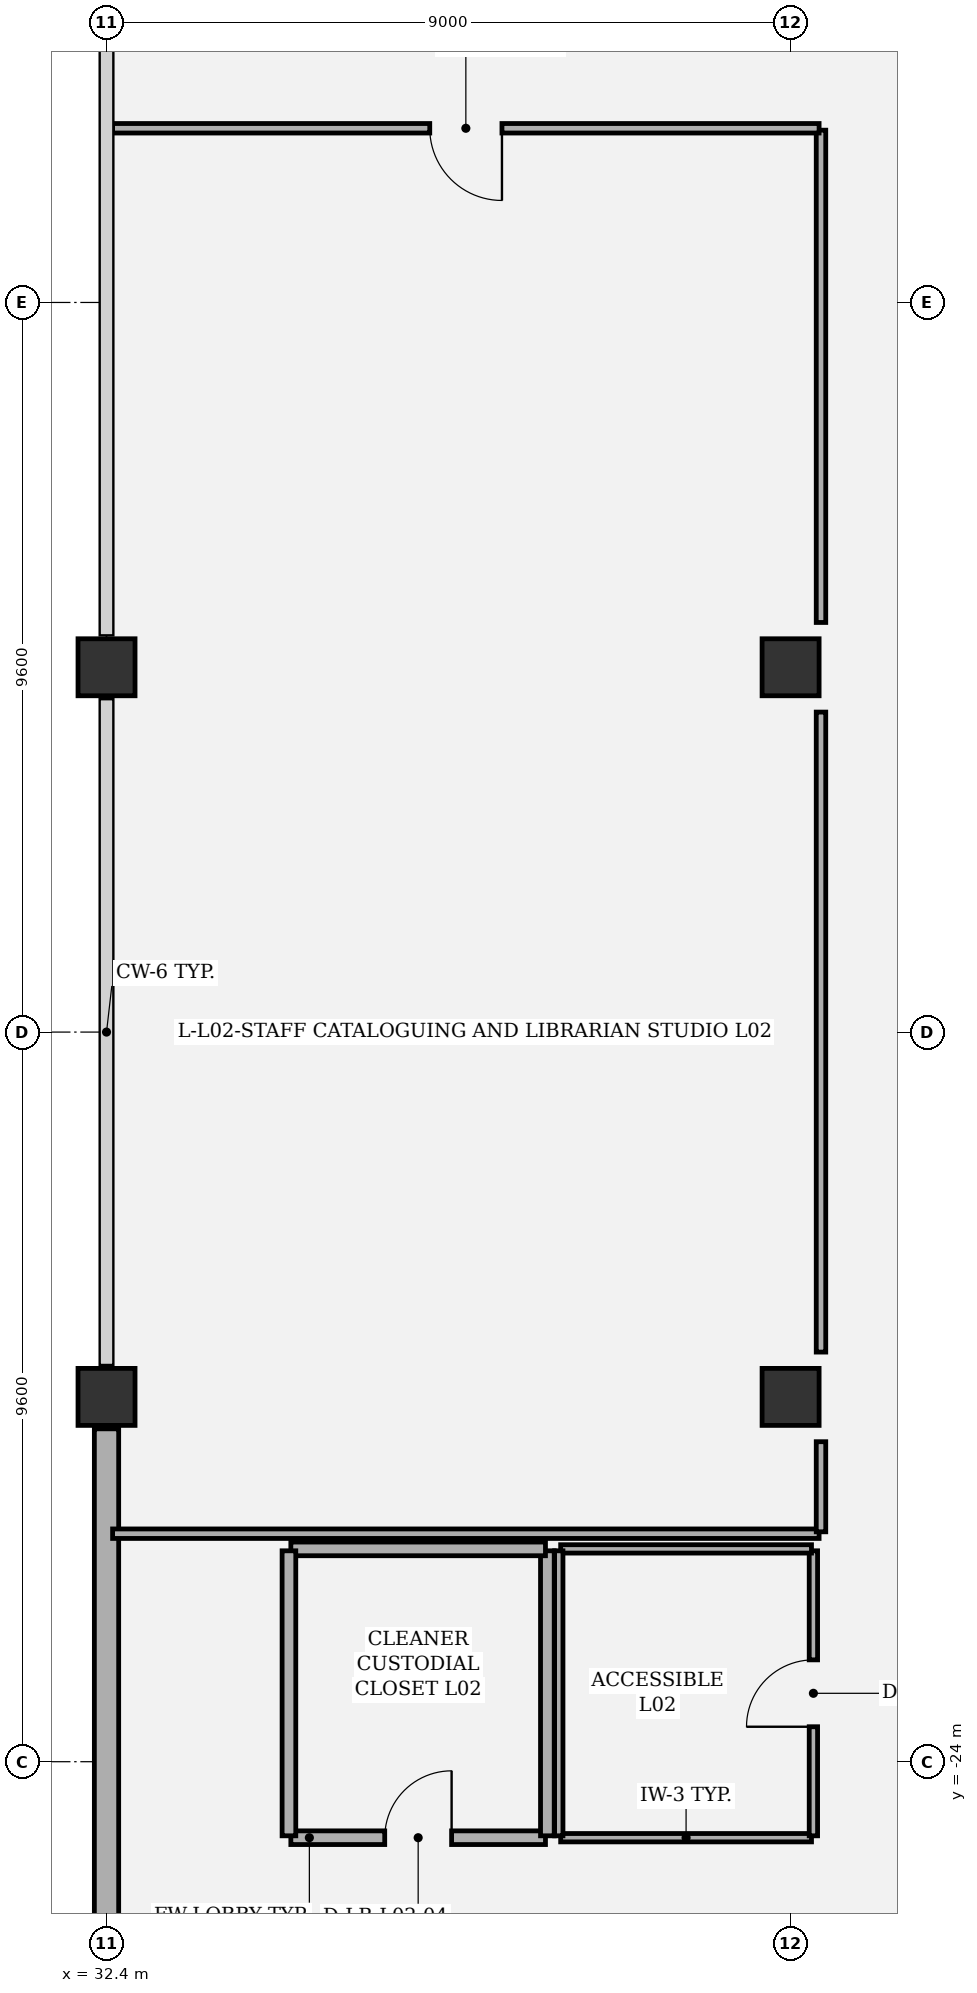
"""IFC4 building model, lengths in metres.
Left out: names, types, materials, properties, quantities, classifications, styles, units other than length and angle.
Written with IfcOpenShell. Run it as: python <this file> out.ifc"""

import sys

from ifc_helpers import new_model, si_unit, direction, frame, frame_2d, origin, origin_2d, place, context, subcontext, project, spatial, rectangle, extrude, element, fill, save


model = new_model("IFC4")
c1 = context("Model", 3, precision=1e-05, world=origin(), true_north=direction((0.0, 1.0)))
c2 = subcontext(c1, "Body", "Model", "MODEL_VIEW")
j1 = project(units=[si_unit("LENGTHUNIT", "METRE"), si_unit("PLANEANGLEUNIT", "RADIAN")], contexts=[c1])
p1 = place(None, origin())
s1 = spatial("IfcSite", under=j1, at=p1, CompositionType="ELEMENT")
p2 = place(p1, origin())
s2 = spatial("IfcBuilding", under=s1, at=p2, CompositionType="ELEMENT")
p3 = place(p2, frame((0.0, 0.0, 12.0)))
s3 = spatial("IfcBuildingStorey", under=s2, at=p3, CompositionType="ELEMENT", Elevation=12.0)
for number, where, z_axis, x_axis in (
    (1, (32.4, -19.2, 0.0), (0.0, 0.0, 1.0), (1.0, 0.0, 0.0)),
    (2, (32.4, -9.6, 0.0), (0.0, 0.0, 1.0), (1.0, 0.0, 0.0)),
    (3, (41.4, -19.2, 0.0), (0.0, 0.0, 1.0), (1.0, 0.0, 0.0)),
    (4, (41.4, -9.6, 0.0), (0.0, 0.0, 1.0), (1.0, 0.0, 0.0)),
):
    element("IfcColumn", number, at=place(p3, frame(where, z_axis=z_axis, x_axis=x_axis)), inside=s3, PredefinedType="COLUMN", context=c2, shape_type="SweptSolid", body=[
        extrude(rectangle(XDim=0.75, YDim=0.75, at=origin_2d()), origin(), (0.0, 0.0, 1.0), 5.0),
    ])
p4 = place(p3, frame((32.4, -28.38, 0.0), z_axis=(0.0, 0.0, 1.0), x_axis=(0.0, 1.0, 0.0)))
e5 = element("IfcWall", 5, at=p4, inside=s3, PredefinedType="SOLIDWALL", context=c2, shape_type="SweptSolid", body=[
    extrude(rectangle(XDim=8.76, YDim=0.32, at=frame_2d((4.38, 0.0))), origin(), (0.0, 0.0, 1.0), 3.937),
])
p5 = place(p3, frame((38.375, -25.0, 0.0), z_axis=(0.0, 0.0, 1.0), x_axis=(1.0, 0.0, 0.0)))
e6 = element("IfcWall", 6, at=p5, inside=s3, PredefinedType="PARTITIONING", context=c2, shape_type="SweptSolid", body=[
    extrude(rectangle(XDim=3.3, YDim=0.11, at=frame_2d((1.65, 0.0))), origin(), (0.0, 0.0, 1.0), 4.74),
])
p6 = place(p3, frame((41.7, -24.975, 0.0), z_axis=(0.0, 0.0, 1.0), x_axis=(0.0, 1.0, 0.0)))
e7 = element("IfcWall", 7, at=p6, inside=s3, PredefinedType="PARTITIONING", context=c2, shape_type="SweptSolid", body=[
    extrude(rectangle(XDim=3.75, YDim=0.11, at=frame_2d((1.875, 0.0))), origin(), (0.0, 0.0, 1.0), 4.094),
])
p7 = place(p6, frame((1.435, 0.0, 0.0)))
e8 = element("IfcOpeningElement", 8, at=p7, cuts=e7, PredefinedType="OPENING", context=c2, shape_type="SweptSolid", body=[
    extrude(rectangle(XDim=0.88, YDim=2.1, at=frame_2d((0.44, 1.05))), frame((0.0, 0.065, 0.0), z_axis=(0.0, -1.0, 0.0), x_axis=(1.0, 0.0, 0.0)), (0.0, 0.0, 1.0), 0.13),
])
p8 = place(p3, frame((41.675, -21.2, 0.0), z_axis=(0.0, 0.0, 1.0), x_axis=(-1.0, 0.0, 0.0)))
e9 = element("IfcWall", 9, at=p8, inside=s3, PredefinedType="PARTITIONING", context=c2, shape_type="SweptSolid", body=[
    extrude(rectangle(XDim=3.3, YDim=0.11, at=frame_2d((1.65, 0.0))), origin(), (0.0, 0.0, 1.0), 4.74),
])
p9 = place(p3, frame((38.35, -21.225, 0.0), z_axis=(0.0, 0.0, 1.0), x_axis=(0.0, -1.0, 0.0)))
e10 = element("IfcWall", 10, at=p9, inside=s3, PredefinedType="PARTITIONING", context=c2, shape_type="SweptSolid", body=[
    extrude(rectangle(XDim=3.75, YDim=0.11, at=frame_2d((1.875, 0.0))), origin(), (0.0, 0.0, 1.0), 4.74),
])
p10 = place(p3, frame((34.825, -25.0, 0.0), z_axis=(0.0, 0.0, 1.0), x_axis=(1.0, 0.0, 0.0)))
e11 = element("IfcWall", 11, at=p10, inside=s3, PredefinedType="PARTITIONING", context=c2, shape_type="SweptSolid", body=[
    extrude(rectangle(XDim=3.35, YDim=0.18, at=frame_2d((1.675, 0.0))), origin(), (0.0, 0.0, 1.0), 4.74),
])
p11 = place(p10, frame((1.235, 0.0, 0.0)))
e12 = element("IfcOpeningElement", 12, at=p11, cuts=e11, PredefinedType="OPENING", context=c2, shape_type="SweptSolid", body=[
    extrude(rectangle(XDim=0.88, YDim=2.1, at=frame_2d((0.44, 1.05))), frame((0.0, 0.1, 0.0), z_axis=(0.0, -1.0, 0.0), x_axis=(1.0, 0.0, 0.0)), (0.0, 0.0, 1.0), 0.2),
])
p12 = place(p3, frame((38.2, -24.975, 0.0), z_axis=(0.0, 0.0, 1.0), x_axis=(0.0, 1.0, 0.0)))
e13 = element("IfcWall", 13, at=p12, inside=s3, PredefinedType="PARTITIONING", context=c2, shape_type="SweptSolid", body=[
    extrude(rectangle(XDim=3.75, YDim=0.18, at=frame_2d((1.875, 0.0))), origin(), (0.0, 0.0, 1.0), 4.74),
])
p13 = place(p3, frame((38.175, -21.2, 0.0), z_axis=(0.0, 0.0, 1.0), x_axis=(-1.0, 0.0, 0.0)))
e14 = element("IfcWall", 14, at=p13, inside=s3, PredefinedType="PARTITIONING", context=c2, shape_type="SweptSolid", body=[
    extrude(rectangle(XDim=3.35, YDim=0.18, at=frame_2d((1.675, 0.0))), origin(), (0.0, 0.0, 1.0), 4.74),
])
p14 = place(p3, frame((34.8, -21.225, 0.0), z_axis=(0.0, 0.0, 1.0), x_axis=(0.0, -1.0, 0.0)))
e15 = element("IfcWall", 15, at=p14, inside=s3, PredefinedType="PARTITIONING", context=c2, shape_type="SweptSolid", body=[
    extrude(rectangle(XDim=3.75, YDim=0.18, at=frame_2d((1.875, 0.0))), origin(), (0.0, 0.0, 1.0), 4.74),
])
p15 = place(p3, frame((32.48, -21.0, 0.0), z_axis=(0.0, 0.0, 1.0), x_axis=(1.0, 0.0, 0.0)))
e16 = element("IfcWall", 16, at=p15, inside=s3, PredefinedType="PARTITIONING", context=c2, shape_type="SweptSolid", body=[
    extrude(rectangle(XDim=9.295, YDim=0.125, at=frame_2d((4.647, 0.0))), origin(), (0.0, 0.0, 1.0), 4.74),
])
p16 = place(p3, frame((41.8, -20.975, 0.0), z_axis=(0.0, 0.0, 1.0), x_axis=(0.0, 1.0, 0.0)))
e17 = element("IfcWall", 17, at=p16, inside=s3, PredefinedType="PARTITIONING", context=c2, shape_type="SweptSolid", body=[
    extrude(rectangle(XDim=1.186, YDim=0.125, at=frame_2d((0.593, 0.0))), origin(), (0.0, 0.0, 1.0), 4.74),
])
p17 = place(p3, frame((41.8, -18.61, 0.0), z_axis=(0.0, 0.0, 1.0), x_axis=(0.0, 1.0, 0.0)))
e18 = element("IfcWall", 18, at=p17, inside=s3, PredefinedType="PARTITIONING", context=c2, shape_type="SweptSolid", body=[
    extrude(rectangle(XDim=8.421, YDim=0.125, at=frame_2d((4.21, 0.0))), origin(), (0.0, 0.0, 1.0), 4.74),
])
p18 = place(p3, frame((41.8, -9.01, 0.0), z_axis=(0.0, 0.0, 1.0), x_axis=(0.0, 1.0, 0.0)))
e19 = element("IfcWall", 19, at=p18, inside=s3, PredefinedType="PARTITIONING", context=c2, shape_type="SweptSolid", body=[
    extrude(rectangle(XDim=6.477, YDim=0.125, at=frame_2d((3.239, 0.0))), origin(), (0.0, 0.0, 1.0), 4.74),
])
p19 = place(p3, frame((41.775, -2.508, 0.0), z_axis=(0.0, 0.0, 1.0), x_axis=(-1.0, 0.0, 0.0)))
e20 = element("IfcWall", 20, at=p19, inside=s3, PredefinedType="PARTITIONING", context=c2, shape_type="SweptSolid", body=[
    extrude(rectangle(XDim=9.295, YDim=0.125, at=frame_2d((4.647, 0.0))), origin(), (0.0, 0.0, 1.0), 4.253),
])
p20 = place(p19, frame((4.172, 0.0, 0.0)))
e21 = element("IfcOpeningElement", 21, at=p20, cuts=e20, PredefinedType="OPENING", context=c2, shape_type="SweptSolid", body=[
    extrude(rectangle(XDim=0.95, YDim=2.15, at=frame_2d((0.475, 1.075))), frame((0.0, 0.073, 0.0), z_axis=(0.0, -1.0, 0.0), x_axis=(1.0, 0.0, 0.0)), (0.0, 0.0, 1.0), 0.145),
])
p21 = place(p7, origin())
e22 = element("IfcDoor", 22, at=p21, inside=s3, OperationType="SINGLE_SWING_LEFT", PredefinedType="DOOR", context=c2, shape_type="SweptSolid", body=[
    extrude(rectangle(XDim=0.88, YDim=2.1, at=frame_2d((0.44, 1.05))), frame((0.0, 0.025, 0.0), z_axis=(0.0, -1.0, 0.0), x_axis=(1.0, 0.0, 0.0)), (0.0, 0.0, 1.0), 0.05),
])
fill(e8, e22)
p22 = place(p11, origin())
e23 = element("IfcDoor", 23, at=p22, inside=s3, OperationType="SINGLE_SWING_RIGHT", PredefinedType="DOOR", context=c2, shape_type="SweptSolid", body=[
    extrude(rectangle(XDim=0.88, YDim=2.1, at=frame_2d((0.44, 1.05))), frame((0.0, 0.025, 0.0), z_axis=(0.0, -1.0, 0.0), x_axis=(1.0, 0.0, 0.0)), (0.0, 0.0, 1.0), 0.05),
])
fill(e12, e23)
p23 = place(p20, origin())
e24 = element("IfcDoor", 24, at=p23, inside=s3, OperationType="SINGLE_SWING_LEFT", PredefinedType="DOOR", context=c2, shape_type="SweptSolid", body=[
    extrude(rectangle(XDim=0.95, YDim=2.15, at=frame_2d((0.475, 1.075))), frame((0.0, 0.025, 0.0), z_axis=(0.0, -1.0, 0.0), x_axis=(1.0, 0.0, 0.0)), (0.0, 0.0, 1.0), 0.05),
])
fill(e21, e24)
save(model, sys.argv[1])
